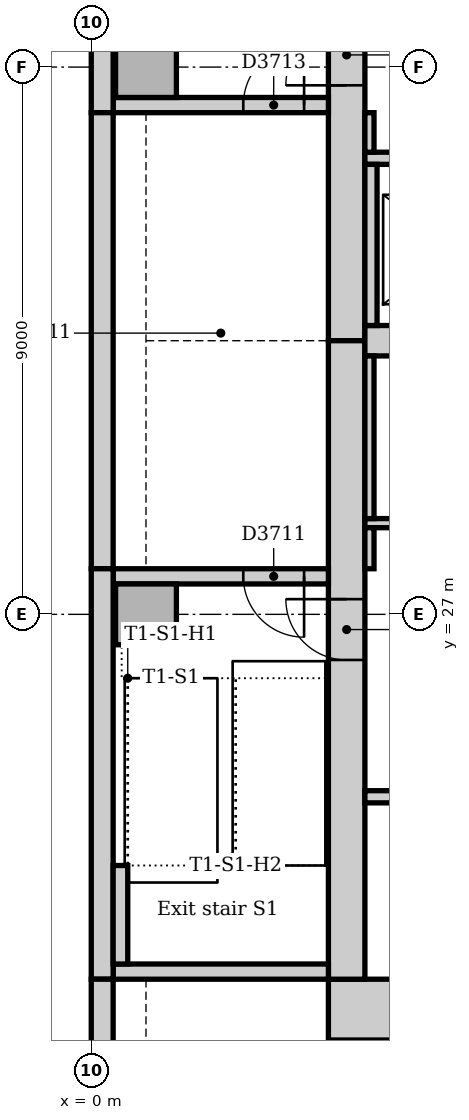
"""IFC4 building model, lengths in metres.
Left out: names, types, materials, properties, quantities, classifications, styles, units other than length and angle.
Written with IfcOpenShell. Run it as: python <this file> out.ifc"""

import sys

from ifc_helpers import new_model, si_unit, direction, frame, frame_2d, origin, origin_2d, place, context, subcontext, project, spatial, rectangle, extrude, element, fill, save


model = new_model("IFC4")
c1 = context("Model", 3, precision=1e-05, world=origin(), true_north=direction((0.0, 1.0)))
c2 = subcontext(c1, "Body", "Model", "MODEL_VIEW")
j1 = project(units=[si_unit("LENGTHUNIT", "METRE"), si_unit("PLANEANGLEUNIT", "RADIAN")], contexts=[c1])
p1 = place(None, origin())
s1 = spatial("IfcSite", under=j1, at=p1, CompositionType="ELEMENT")
p2 = place(p1, origin())
s2 = spatial("IfcBuilding", under=s1, at=p2, CompositionType="ELEMENT")
p3 = place(p2, frame((0.0, 0.0, 79.0)))
s3 = spatial("IfcBuildingStorey", under=s2, at=p3, CompositionType="ELEMENT", Elevation=79.0)
p4 = place(p3, frame((3.9, 20.5, 0.0), z_axis=(0.0, 0.0, 1.0), x_axis=(1.0, 0.0, 0.0)))
e1 = element("IfcWall", 1, at=p4, inside=s3, PredefinedType="SOLIDWALL", context=c2, shape_type="SweptSolid", body=[
    extrude(rectangle(XDim=19.6, YDim=1.0, at=frame_2d((9.8, 0.0))), origin(), (0.0, 0.0, 1.0), 4.0),
])
p5 = place(p3, frame((4.2, 42.0, 0.0), z_axis=(0.0, 0.0, 1.0), x_axis=(0.0, -1.0, 0.0)))
e2 = element("IfcWall", 2, at=p5, inside=s3, PredefinedType="SOLIDWALL", context=c2, shape_type="SweptSolid", body=[
    extrude(rectangle(XDim=10.5, YDim=0.6, at=frame_2d((5.25, 0.0))), origin(), (0.0, 0.0, 1.0), 4.0),
])
p6 = place(p5, frame((5.3, 0.0, 0.0)))
e3 = element("IfcOpeningElement", 3, at=p6, cuts=e2, PredefinedType="OPENING", context=c2, shape_type="SweptSolid", body=[
    extrude(rectangle(XDim=1.0, YDim=2.1, at=frame_2d((0.5, 1.05))), frame((0.0, 0.31, 0.0), z_axis=(0.0, -1.0, 0.0), x_axis=(1.0, 0.0, 0.0)), (0.0, 0.0, 1.0), 0.62),
])
p7 = place(p3, frame((4.2, 31.5, 0.0), z_axis=(0.0, 0.0, 1.0), x_axis=(0.0, -1.0, 0.0)))
e4 = element("IfcWall", 4, at=p7, inside=s3, PredefinedType="SOLIDWALL", context=c2, shape_type="SweptSolid", body=[
    extrude(rectangle(XDim=10.5, YDim=0.6, at=frame_2d((5.25, 0.0))), origin(), (0.0, 0.0, 1.0), 4.0),
])
p8 = place(p7, frame((4.25, 0.0, 0.0)))
e5 = element("IfcOpeningElement", 5, at=p8, cuts=e4, PredefinedType="OPENING", context=c2, shape_type="SweptSolid", body=[
    extrude(rectangle(XDim=1.0, YDim=2.1, at=frame_2d((0.5, 1.05))), frame((0.0, 0.31, 0.0), z_axis=(0.0, -1.0, 0.0), x_axis=(1.0, 0.0, 0.0)), (0.0, 0.0, 1.0), 0.62),
])
p9 = place(p3, frame((4.5, 31.5, 0.0), z_axis=(0.0, 0.0, 1.0), x_axis=(1.0, 0.0, 0.0)))
e6 = element("IfcWall", 6, at=p9, inside=s3, PredefinedType="SOLIDWALL", context=c2, shape_type="SweptSolid", body=[
    extrude(rectangle(XDim=18.0, YDim=0.5, at=frame_2d((9.0, 0.0))), origin(), (0.0, 0.0, 1.0), 4.0),
])
p10 = place(p3, frame((0.36, 21.125, 0.0), z_axis=(0.0, 0.0, 1.0), x_axis=(1.0, 0.0, 0.0)))
e7 = element("IfcWall", 7, at=p10, inside=s3, PredefinedType="SOLIDWALL", context=c2, shape_type="SweptSolid", body=[
    extrude(rectangle(XDim=3.54, YDim=0.25, at=frame_2d((1.77, 0.0))), origin(), (0.0, 0.0, 1.0), 4.0),
])
p11 = place(p3, frame((3.9, 27.625, 0.0), z_axis=(0.0, 0.0, 1.0), x_axis=(-1.0, 0.0, 0.0)))
e8 = element("IfcWall", 8, at=p11, inside=s3, PredefinedType="SOLIDWALL", context=c2, shape_type="SweptSolid", body=[
    extrude(rectangle(XDim=3.54, YDim=0.25, at=frame_2d((1.77, 0.0))), origin(), (0.0, 0.0, 1.0), 4.0),
])
p12 = place(p11, frame((0.4, 0.0, 0.0)))
e9 = element("IfcOpeningElement", 9, at=p12, cuts=e8, PredefinedType="OPENING", context=c2, shape_type="SweptSolid", body=[
    extrude(rectangle(XDim=1.0, YDim=2.1, at=frame_2d((0.5, 1.05))), frame((0.0, 0.135, 0.0), z_axis=(0.0, -1.0, 0.0), x_axis=(1.0, 0.0, 0.0)), (0.0, 0.0, 1.0), 0.27),
])
p13 = place(p3, frame((0.36, 35.375, 0.0), z_axis=(0.0, 0.0, 1.0), x_axis=(1.0, 0.0, 0.0)))
e10 = element("IfcWall", 10, at=p13, inside=s3, PredefinedType="SOLIDWALL", context=c2, shape_type="SweptSolid", body=[
    extrude(rectangle(XDim=3.54, YDim=0.25, at=frame_2d((1.77, 0.0))), origin(), (0.0, 0.0, 1.0), 4.0),
])
p14 = place(p13, frame((2.14, 0.0, 0.0)))
e11 = element("IfcOpeningElement", 11, at=p14, cuts=e10, PredefinedType="OPENING", context=c2, shape_type="SweptSolid", body=[
    extrude(rectangle(XDim=1.0, YDim=2.1, at=frame_2d((0.5, 1.05))), frame((0.0, 0.135, 0.0), z_axis=(0.0, -1.0, 0.0), x_axis=(1.0, 0.0, 0.0)), (0.0, 0.0, 1.0), 0.27),
])
for number, where, z_axis, x_axis in (
    (12, (0.9, 27.0, 0.0), (0.0, 0.0, 1.0), (1.0, 0.0, 0.0)),
    (13, (0.9, 36.0, 0.0), (0.0, 0.0, 1.0), (1.0, 0.0, 0.0)),
):
    element("IfcColumn", number, at=place(p3, frame(where, z_axis=z_axis, x_axis=x_axis)), inside=s3, PredefinedType="COLUMN", context=c2, shape_type="SweptSolid", body=[
        extrude(rectangle(XDim=1.0, YDim=1.0, at=origin_2d()), origin(), (0.0, 0.0, 1.0), 4.0),
    ])
p15 = place(p3, frame((0.18, 40.757, 0.0), z_axis=(0.0, 0.0, 1.0), x_axis=(0.0, -1.0, 0.0)))
e14 = element("IfcWall", 14, at=p15, inside=s3, PredefinedType="STANDARD", context=c2, shape_type="SweptSolid", body=[
    extrude(rectangle(XDim=5.507, YDim=0.36, at=frame_2d((2.754, 0.0))), origin(), (0.0, 0.0, 1.0), 3.85),
])
p16 = place(p3, frame((0.18, 35.25, 0.0), z_axis=(0.0, 0.0, 1.0), x_axis=(0.0, -1.0, 0.0)))
e15 = element("IfcWall", 15, at=p16, inside=s3, PredefinedType="STANDARD", context=c2, shape_type="SweptSolid", body=[
    extrude(rectangle(XDim=7.5, YDim=0.36, at=frame_2d((3.75, 0.0))), origin(), (0.0, 0.0, 1.0), 3.85),
])
p17 = place(p3, frame((0.18, 27.75, 0.0), z_axis=(0.0, 0.0, 1.0), x_axis=(0.0, -1.0, 0.0)))
e16 = element("IfcWall", 16, at=p17, inside=s3, PredefinedType="STANDARD", context=c2, shape_type="SweptSolid", body=[
    extrude(rectangle(XDim=6.75, YDim=0.36, at=frame_2d((3.375, 0.0))), origin(), (0.0, 0.0, 1.0), 3.85),
])
p18 = place(p3, frame((0.18, 21.0, 0.0), z_axis=(0.0, 0.0, 1.0), x_axis=(0.0, -1.0, 0.0)))
e17 = element("IfcWall", 17, at=p18, inside=s3, PredefinedType="STANDARD", context=c2, shape_type="SweptSolid", body=[
    extrude(rectangle(XDim=16.757, YDim=0.36, at=frame_2d((8.379, 0.0))), origin(), (0.0, 0.0, 1.0), 3.85),
])
p19 = place(p18, frame((1.35, 0.0, 0.9)))
e18 = element("IfcOpeningElement", 18, at=p19, cuts=e17, PredefinedType="OPENING", context=c2, shape_type="SweptSolid", body=[
    extrude(rectangle(XDim=3.3, YDim=1.6, at=frame_2d((1.65, 0.8))), frame((0.0, 0.19, 0.0), z_axis=(0.0, -1.0, 0.0), x_axis=(1.0, 0.0, 0.0)), (0.0, 0.0, 1.0), 0.38),
])
p20 = place(p18, frame((6.15, 0.0, 0.9)))
e19 = element("IfcOpeningElement", 19, at=p20, cuts=e17, PredefinedType="OPENING", context=c2, shape_type="SweptSolid", body=[
    extrude(rectangle(XDim=3.3, YDim=1.6, at=frame_2d((1.65, 0.8))), frame((0.0, 0.19, 0.0), z_axis=(0.0, -1.0, 0.0), x_axis=(1.0, 0.0, 0.0)), (0.0, 0.0, 1.0), 0.38),
])
p21 = place(p18, frame((10.35, 0.0, 0.9)))
e20 = element("IfcOpeningElement", 20, at=p21, cuts=e17, PredefinedType="OPENING", context=c2, shape_type="SweptSolid", body=[
    extrude(rectangle(XDim=3.3, YDim=1.6, at=frame_2d((1.65, 0.8))), frame((0.0, 0.19, 0.0), z_axis=(0.0, -1.0, 0.0), x_axis=(1.0, 0.0, 0.0)), (0.0, 0.0, 1.0), 0.38),
])
p22 = place(p3, frame((0.48, 21.25, 0.0), z_axis=(0.0, 0.0, 1.0), x_axis=(0.0, 1.0, 0.0)))
e21 = element("IfcWall", 21, at=p22, inside=s3, PredefinedType="STANDARD", context=c2, shape_type="SweptSolid", body=[
    extrude(rectangle(XDim=1.62, YDim=0.24, at=frame_2d((0.81, 0.0))), origin(), (0.0, 0.0, 1.0), 4.0),
])
p23 = place(p3, frame((4.5, 24.0, 0.0), z_axis=(0.0, 0.0, 1.0), x_axis=(1.0, 0.0, 0.0)))
e22 = element("IfcWall", 22, at=p23, inside=s3, PredefinedType="PARTITIONING", context=c2, shape_type="SweptSolid", body=[
    extrude(rectangle(XDim=18.0, YDim=0.2, at=frame_2d((9.0, 0.0))), origin(), (0.0, 0.0, 1.0), 3.85),
])
p24 = place(p23, frame((0.95, 0.0, 0.0)))
e23 = element("IfcOpeningElement", 23, at=p24, cuts=e22, PredefinedType="OPENING", context=c2, shape_type="SweptSolid", body=[
    extrude(rectangle(XDim=1.1, YDim=2.1, at=frame_2d((0.55, 1.05))), frame((0.0, 0.11, 0.0), z_axis=(0.0, -1.0, 0.0), x_axis=(1.0, 0.0, 0.0)), (0.0, 0.0, 1.0), 0.22),
])
p25 = place(p23, frame((3.95, 0.0, 0.0)))
e24 = element("IfcOpeningElement", 24, at=p25, cuts=e22, PredefinedType="OPENING", context=c2, shape_type="SweptSolid", body=[
    extrude(rectangle(XDim=1.1, YDim=2.1, at=frame_2d((0.55, 1.05))), frame((0.0, 0.11, 0.0), z_axis=(0.0, -1.0, 0.0), x_axis=(1.0, 0.0, 0.0)), (0.0, 0.0, 1.0), 0.22),
])
p26 = place(p23, frame((6.95, 0.0, 0.0)))
e25 = element("IfcOpeningElement", 25, at=p26, cuts=e22, PredefinedType="OPENING", context=c2, shape_type="SweptSolid", body=[
    extrude(rectangle(XDim=1.1, YDim=2.1, at=frame_2d((0.55, 1.05))), frame((0.0, 0.11, 0.0), z_axis=(0.0, -1.0, 0.0), x_axis=(1.0, 0.0, 0.0)), (0.0, 0.0, 1.0), 0.22),
])
p27 = place(p23, frame((9.95, 0.0, 0.0)))
e26 = element("IfcOpeningElement", 26, at=p27, cuts=e22, PredefinedType="OPENING", context=c2, shape_type="SweptSolid", body=[
    extrude(rectangle(XDim=1.1, YDim=2.1, at=frame_2d((0.55, 1.05))), frame((0.0, 0.11, 0.0), z_axis=(0.0, -1.0, 0.0), x_axis=(1.0, 0.0, 0.0)), (0.0, 0.0, 1.0), 0.22),
])
p28 = place(p23, frame((12.95, 0.0, 0.0)))
e27 = element("IfcOpeningElement", 27, at=p28, cuts=e22, PredefinedType="OPENING", context=c2, shape_type="SweptSolid", body=[
    extrude(rectangle(XDim=1.1, YDim=2.1, at=frame_2d((0.55, 1.05))), frame((0.0, 0.11, 0.0), z_axis=(0.0, -1.0, 0.0), x_axis=(1.0, 0.0, 0.0)), (0.0, 0.0, 1.0), 0.22),
])
p29 = place(p23, frame((15.95, 0.0, 0.0)))
e28 = element("IfcOpeningElement", 28, at=p29, cuts=e22, PredefinedType="OPENING", context=c2, shape_type="SweptSolid", body=[
    extrude(rectangle(XDim=1.1, YDim=2.1, at=frame_2d((0.55, 1.05))), frame((0.0, 0.11, 0.0), z_axis=(0.0, -1.0, 0.0), x_axis=(1.0, 0.0, 0.0)), (0.0, 0.0, 1.0), 0.22),
])
p30 = place(p3, frame((4.5, 34.5, 0.0), z_axis=(0.0, 0.0, 1.0), x_axis=(1.0, 0.0, 0.0)))
e29 = element("IfcWall", 29, at=p30, inside=s3, PredefinedType="PARTITIONING", context=c2, shape_type="SweptSolid", body=[
    extrude(rectangle(XDim=18.0, YDim=0.2, at=frame_2d((9.0, 0.0))), origin(), (0.0, 0.0, 1.0), 3.85),
])
p31 = place(p30, frame((0.95, 0.0, 0.0)))
e30 = element("IfcOpeningElement", 30, at=p31, cuts=e29, PredefinedType="OPENING", context=c2, shape_type="SweptSolid", body=[
    extrude(rectangle(XDim=1.1, YDim=2.1, at=frame_2d((0.55, 1.05))), frame((0.0, 0.11, 0.0), z_axis=(0.0, -1.0, 0.0), x_axis=(1.0, 0.0, 0.0)), (0.0, 0.0, 1.0), 0.22),
])
p32 = place(p30, frame((3.95, 0.0, 0.0)))
e31 = element("IfcOpeningElement", 31, at=p32, cuts=e29, PredefinedType="OPENING", context=c2, shape_type="SweptSolid", body=[
    extrude(rectangle(XDim=1.1, YDim=2.1, at=frame_2d((0.55, 1.05))), frame((0.0, 0.11, 0.0), z_axis=(0.0, -1.0, 0.0), x_axis=(1.0, 0.0, 0.0)), (0.0, 0.0, 1.0), 0.22),
])
p33 = place(p30, frame((12.95, 0.0, 0.0)))
e32 = element("IfcOpeningElement", 32, at=p33, cuts=e29, PredefinedType="OPENING", context=c2, shape_type="SweptSolid", body=[
    extrude(rectangle(XDim=1.1, YDim=2.1, at=frame_2d((0.55, 1.05))), frame((0.0, 0.11, 0.0), z_axis=(0.0, -1.0, 0.0), x_axis=(1.0, 0.0, 0.0)), (0.0, 0.0, 1.0), 0.22),
])
p34 = place(p30, frame((15.95, 0.0, 0.0)))
e33 = element("IfcOpeningElement", 33, at=p34, cuts=e29, PredefinedType="OPENING", context=c2, shape_type="SweptSolid", body=[
    extrude(rectangle(XDim=1.1, YDim=2.1, at=frame_2d((0.55, 1.05))), frame((0.0, 0.11, 0.0), z_axis=(0.0, -1.0, 0.0), x_axis=(1.0, 0.0, 0.0)), (0.0, 0.0, 1.0), 0.22),
])
p35 = place(p3, frame((4.6, 31.75, 0.0), z_axis=(0.0, 0.0, 1.0), x_axis=(0.0, 1.0, 0.0)))
e34 = element("IfcWall", 34, at=p35, inside=s3, PredefinedType="PARTITIONING", context=c2, shape_type="SweptSolid", body=[
    extrude(rectangle(XDim=2.65, YDim=0.2, at=frame_2d((1.325, 0.0))), origin(), (0.0, 0.0, 1.0), 3.85),
])
p36 = place(p3, frame((4.5, 28.5, 0.0), z_axis=(0.0, 0.0, 1.0), x_axis=(1.0, 0.0, 0.0)))
e35 = element("IfcWall", 35, at=p36, inside=s3, PredefinedType="PARTITIONING", context=c2, shape_type="SweptSolid", body=[
    extrude(rectangle(XDim=18.0, YDim=0.15, at=frame_2d((9.0, 0.0))), origin(), (0.0, 0.0, 1.0), 3.85),
])
p37 = place(p36, frame((3.35, 0.0, 0.0)))
e36 = element("IfcOpeningElement", 36, at=p37, cuts=e35, PredefinedType="OPENING", context=c2, shape_type="SweptSolid", body=[
    extrude(rectangle(XDim=0.9, YDim=2.1, at=frame_2d((0.45, 1.05))), frame((0.0, 0.085, 0.0), z_axis=(0.0, -1.0, 0.0), x_axis=(1.0, 0.0, 0.0)), (0.0, 0.0, 1.0), 0.17),
])
p38 = place(p36, frame((8.55, 0.0, 0.0)))
e37 = element("IfcOpeningElement", 37, at=p38, cuts=e35, PredefinedType="OPENING", context=c2, shape_type="SweptSolid", body=[
    extrude(rectangle(XDim=0.9, YDim=2.1, at=frame_2d((0.45, 1.05))), frame((0.0, 0.085, 0.0), z_axis=(0.0, -1.0, 0.0), x_axis=(1.0, 0.0, 0.0)), (0.0, 0.0, 1.0), 0.17),
])
p39 = place(p36, frame((13.7, 0.0, 0.0)))
e38 = element("IfcOpeningElement", 38, at=p39, cuts=e35, PredefinedType="OPENING", context=c2, shape_type="SweptSolid", body=[
    extrude(rectangle(XDim=0.9, YDim=2.1, at=frame_2d((0.45, 1.05))), frame((0.0, 0.085, 0.0), z_axis=(0.0, -1.0, 0.0), x_axis=(1.0, 0.0, 0.0)), (0.0, 0.0, 1.0), 0.17),
])
p40 = place(p3, frame((4.575, 27.75, 0.0), z_axis=(0.0, 0.0, 1.0), x_axis=(0.0, 1.0, 0.0)))
e39 = element("IfcWall", 39, at=p40, inside=s3, PredefinedType="PARTITIONING", context=c2, shape_type="SweptSolid", body=[
    extrude(rectangle(XDim=0.675, YDim=0.15, at=frame_2d((0.338, 0.0))), origin(), (0.0, 0.0, 1.0), 3.85),
])
p41 = place(p3, frame((4.575, 28.575, 0.0), z_axis=(0.0, 0.0, 1.0), x_axis=(0.0, 1.0, 0.0)))
e40 = element("IfcWall", 40, at=p41, inside=s3, PredefinedType="PARTITIONING", context=c2, shape_type="SweptSolid", body=[
    extrude(rectangle(XDim=2.675, YDim=0.15, at=frame_2d((1.337, 0.0))), origin(), (0.0, 0.0, 1.0), 3.85),
])
p42 = place(p3, frame((4.575, 34.6, 0.0), z_axis=(0.0, 0.0, 1.0), x_axis=(0.0, 1.0, 0.0)))
e41 = element("IfcWall", 41, at=p42, inside=s3, PredefinedType="PARTITIONING", context=c2, shape_type="SweptSolid", body=[
    extrude(rectangle(XDim=0.65, YDim=0.15, at=frame_2d((0.325, 0.0))), origin(), (0.0, 0.0, 1.0), 3.85),
])
p43 = place(p8, frame((1.0, 0.0, 0.0), z_axis=(0.0, 0.0, 1.0), x_axis=(-1.0, 0.0, 0.0)))
e42 = element("IfcDoor", 42, at=p43, inside=s3, OperationType="SINGLE_SWING_RIGHT", PredefinedType="DOOR", context=c2, shape_type="SweptSolid", body=[
    extrude(rectangle(XDim=1.0, YDim=2.1, at=frame_2d((0.5, 1.05))), frame((0.0, 0.025, 0.0), z_axis=(0.0, -1.0, 0.0), x_axis=(1.0, 0.0, 0.0)), (0.0, 0.0, 1.0), 0.05),
])
fill(e5, e42)
p44 = place(p12, origin())
e43 = element("IfcDoor", 43, at=p44, inside=s3, OperationType="SINGLE_SWING_LEFT", PredefinedType="DOOR", context=c2, shape_type="SweptSolid", body=[
    extrude(rectangle(XDim=1.0, YDim=2.1, at=frame_2d((0.5, 1.05))), frame((0.0, 0.025, 0.0), z_axis=(0.0, -1.0, 0.0), x_axis=(1.0, 0.0, 0.0)), (0.0, 0.0, 1.0), 0.05),
])
fill(e9, e43)
p45 = place(p6, frame((1.0, 0.0, 0.0), z_axis=(0.0, 0.0, 1.0), x_axis=(-1.0, 0.0, 0.0)))
e44 = element("IfcDoor", 44, at=p45, inside=s3, OperationType="SINGLE_SWING_LEFT", PredefinedType="DOOR", context=c2, shape_type="SweptSolid", body=[
    extrude(rectangle(XDim=1.0, YDim=2.1, at=frame_2d((0.5, 1.05))), frame((0.0, 0.025, 0.0), z_axis=(0.0, -1.0, 0.0), x_axis=(1.0, 0.0, 0.0)), (0.0, 0.0, 1.0), 0.05),
])
fill(e3, e44)
p46 = place(p14, origin())
e45 = element("IfcDoor", 45, at=p46, inside=s3, OperationType="SINGLE_SWING_RIGHT", PredefinedType="DOOR", context=c2, shape_type="SweptSolid", body=[
    extrude(rectangle(XDim=1.0, YDim=2.1, at=frame_2d((0.5, 1.05))), frame((0.0, 0.025, 0.0), z_axis=(0.0, -1.0, 0.0), x_axis=(1.0, 0.0, 0.0)), (0.0, 0.0, 1.0), 0.05),
])
fill(e11, e45)
save(model, sys.argv[1])
